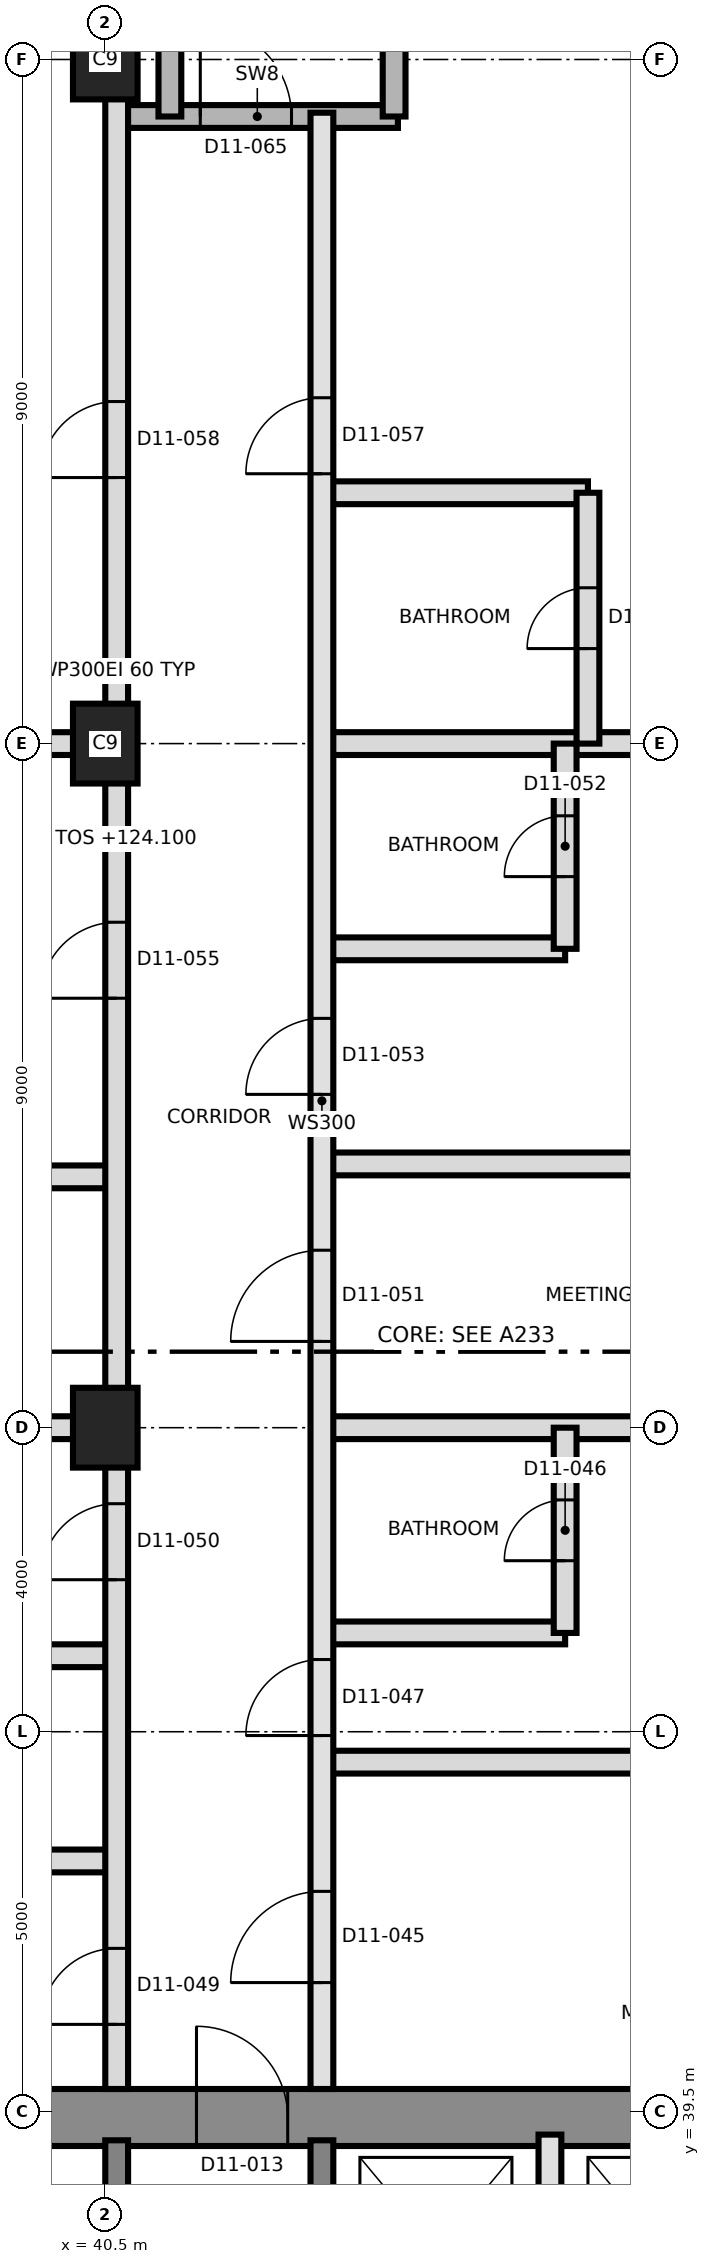
"""IFC4 building model, lengths in metres.
Left out: names, types, materials, properties, quantities, classifications, styles, units other than length and angle.
Written with IfcOpenShell. Run it as: python <this file> out.ifc"""

import sys

from ifc_helpers import new_model, si_unit, direction, frame, frame_2d, origin, origin_2d, place, context, subcontext, project, spatial, rectangle, extrude, element, fill, save


model = new_model("IFC4")
c1 = context("Model", 3, precision=1e-05, world=origin(), true_north=direction((0.0, 1.0)))
c2 = subcontext(c1, "Body", "Model", "MODEL_VIEW")
j1 = project(units=[si_unit("LENGTHUNIT", "METRE"), si_unit("PLANEANGLEUNIT", "RADIAN")], contexts=[c1])
p1 = place(None, origin())
s1 = spatial("IfcSite", under=j1, at=p1, CompositionType="ELEMENT")
p2 = place(p1, origin())
s2 = spatial("IfcBuilding", under=s1, at=p2, CompositionType="ELEMENT")
p3 = place(p2, frame((0.0, 0.0, 124.1)))
s3 = spatial("IfcBuildingStorey", under=s2, at=p3, CompositionType="ELEMENT", Elevation=124.1)
p4 = place(p3, frame((31.125, 39.425, 0.0), z_axis=(0.0, 0.0, 1.0), x_axis=(1.0, 0.0, 0.0)))
e1 = element("IfcWall", 1, at=p4, inside=s3, PredefinedType="SHEAR", context=c2, shape_type="SweptSolid", body=[
    extrude(rectangle(XDim=27.0, YDim=0.75, at=frame_2d((13.5, 0.0))), origin(), (0.0, 0.0, 1.0), 3.7),
])
p5 = place(p4, frame((10.575, 0.0, 0.0)))
e2 = element("IfcOpeningElement", 2, at=p5, cuts=e1, PredefinedType="OPENING", context=c2, shape_type="SweptSolid", body=[
    extrude(rectangle(XDim=1.2, YDim=2.1, at=frame_2d((0.6, 1.05))), frame((0.0, 0.385, 0.0), z_axis=(0.0, -1.0, 0.0), x_axis=(1.0, 0.0, 0.0)), (0.0, 0.0, 1.0), 0.77),
])
for number, where, z_axis, x_axis in (
    (3, (40.65, 33.5, 0.0), (0.0, 0.0, 1.0), (0.0, 1.0, 0.0)),
    (4, (43.35, 33.5, 0.0), (0.0, 0.0, 1.0), (0.0, 1.0, 0.0)),
):
    element("IfcWall", number, at=place(p3, frame(where, z_axis=z_axis, x_axis=x_axis)), inside=s3, PredefinedType="SHEAR", context=c2, shape_type="SweptSolid", body=[
        extrude(rectangle(XDim=5.625, YDim=0.3, at=frame_2d((2.812, 0.0))), origin(), (0.0, 0.0, 1.0), 3.7),
    ])
for number, where, z_axis, x_axis in (
    (5, (40.5, 48.5, 0.0), (0.0, 0.0, 1.0), (0.0, 1.0, 0.0)),
    (6, (40.5, 57.5, 0.0), (0.0, 0.0, 1.0), (0.0, 1.0, 0.0)),
    (7, (40.5, 66.5, 0.0), (0.0, 0.0, 1.0), (0.0, 1.0, 0.0)),
):
    element("IfcColumn", number, at=place(p3, frame(where, z_axis=z_axis, x_axis=x_axis)), inside=s3, PredefinedType="COLUMN", context=c2, shape_type="SweptSolid", body=[
        extrude(rectangle(XDim=1.05, YDim=0.85, at=origin_2d()), origin(), (0.0, 0.0, 1.0), 3.7),
    ])
p6 = place(p3, frame((46.35, 36.2, 0.0), z_axis=(0.0, 0.0, 1.0), x_axis=(0.0, 1.0, 0.0)))
e8 = element("IfcWall", 8, at=p6, inside=s3, PredefinedType="SOLIDWALL", context=c2, shape_type="SweptSolid", body=[
    extrude(rectangle(XDim=3.0, YDim=0.3, at=frame_2d((1.5, 0.0))), origin(), (0.0, 0.0, 1.0), 3.4),
])
p7 = place(p3, frame((37.45, 42.8, 0.0), z_axis=(0.0, 0.0, 1.0), x_axis=(1.0, 0.0, 0.0)))
e9 = element("IfcWall", 9, at=p7, inside=s3, PredefinedType="PARTITIONING", context=c2, shape_type="SweptSolid", body=[
    extrude(rectangle(XDim=3.2, YDim=0.3, at=frame_2d((1.6, 0.0))), origin(), (0.0, 0.0, 1.0), 3.4),
])
p8 = place(p3, frame((43.35, 44.1, 0.0), z_axis=(0.0, 0.0, 1.0), x_axis=(1.0, 0.0, 0.0)))
e10 = element("IfcWall", 10, at=p8, inside=s3, PredefinedType="PARTITIONING", context=c2, shape_type="SweptSolid", body=[
    extrude(rectangle(XDim=8.032, YDim=0.3, at=frame_2d((4.016, 0.0))), origin(), (0.0, 0.0, 1.0), 3.4),
])
p9 = place(p3, frame((30.135, 45.5, 0.0), z_axis=(0.0, 0.0, 1.0), x_axis=(1.0, 0.0, 0.0)))
e11 = element("IfcWall", 11, at=p9, inside=s3, PredefinedType="PARTITIONING", context=c2, shape_type="SweptSolid", body=[
    extrude(rectangle(XDim=10.515, YDim=0.3, at=frame_2d((5.257, 0.0))), origin(), (0.0, 0.0, 1.0), 3.4),
])
p10 = place(p3, frame((43.35, 45.8, 0.0), z_axis=(0.0, 0.0, 1.0), x_axis=(1.0, 0.0, 0.0)))
e12 = element("IfcWall", 12, at=p10, inside=s3, PredefinedType="PARTITIONING", context=c2, shape_type="SweptSolid", body=[
    extrude(rectangle(XDim=3.2, YDim=0.3, at=frame_2d((1.6, 0.0))), origin(), (0.0, 0.0, 1.0), 3.4),
])
p11 = place(p3, frame((30.135, 48.5, 0.0), z_axis=(0.0, 0.0, 1.0), x_axis=(1.0, 0.0, 0.0)))
e13 = element("IfcWall", 13, at=p11, inside=s3, PredefinedType="PARTITIONING", context=c2, shape_type="SweptSolid", body=[
    extrude(rectangle(XDim=10.515, YDim=0.3, at=frame_2d((5.257, 0.0))), origin(), (0.0, 0.0, 1.0), 3.4),
])
p12 = place(p3, frame((43.35, 48.5, 0.0), z_axis=(0.0, 0.0, 1.0), x_axis=(1.0, 0.0, 0.0)))
e14 = element("IfcWall", 14, at=p12, inside=s3, PredefinedType="PARTITIONING", context=c2, shape_type="SweptSolid", body=[
    extrude(rectangle(XDim=7.695, YDim=0.3, at=frame_2d((3.847, 0.0))), origin(), (0.0, 0.0, 1.0), 3.4),
])
p13 = place(p3, frame((37.15, 51.8, 0.0), z_axis=(0.0, 0.0, 1.0), x_axis=(1.0, 0.0, 0.0)))
e15 = element("IfcWall", 15, at=p13, inside=s3, PredefinedType="PARTITIONING", context=c2, shape_type="SweptSolid", body=[
    extrude(rectangle(XDim=3.5, YDim=0.3, at=frame_2d((1.75, 0.0))), origin(), (0.0, 0.0, 1.0), 3.4),
])
p14 = place(p3, frame((43.35, 51.97, 0.0), z_axis=(0.0, 0.0, 1.0), x_axis=(1.0, 0.0, 0.0)))
e16 = element("IfcWall", 16, at=p14, inside=s3, PredefinedType="PARTITIONING", context=c2, shape_type="SweptSolid", body=[
    extrude(rectangle(XDim=7.695, YDim=0.3, at=frame_2d((3.847, 0.0))), origin(), (0.0, 0.0, 1.0), 3.4),
])
p15 = place(p3, frame((43.35, 54.8, 0.0), z_axis=(0.0, 0.0, 1.0), x_axis=(1.0, 0.0, 0.0)))
e17 = element("IfcWall", 17, at=p15, inside=s3, PredefinedType="PARTITIONING", context=c2, shape_type="SweptSolid", body=[
    extrude(rectangle(XDim=3.2, YDim=0.3, at=frame_2d((1.6, 0.0))), origin(), (0.0, 0.0, 1.0), 3.4),
])
p16 = place(p3, frame((30.135, 57.5, 0.0), z_axis=(0.0, 0.0, 1.0), x_axis=(1.0, 0.0, 0.0)))
e18 = element("IfcWall", 18, at=p16, inside=s3, PredefinedType="PARTITIONING", context=c2, shape_type="SweptSolid", body=[
    extrude(rectangle(XDim=10.515, YDim=0.3, at=frame_2d((5.257, 0.0))), origin(), (0.0, 0.0, 1.0), 3.4),
])
p17 = place(p3, frame((43.35, 57.5, 0.0), z_axis=(0.0, 0.0, 1.0), x_axis=(1.0, 0.0, 0.0)))
e19 = element("IfcWall", 19, at=p17, inside=s3, PredefinedType="PARTITIONING", context=c2, shape_type="SweptSolid", body=[
    extrude(rectangle(XDim=7.695, YDim=0.3, at=frame_2d((3.847, 0.0))), origin(), (0.0, 0.0, 1.0), 3.4),
])
p18 = place(p3, frame((43.35, 60.8, 0.0), z_axis=(0.0, 0.0, 1.0), x_axis=(1.0, 0.0, 0.0)))
e20 = element("IfcWall", 20, at=p18, inside=s3, PredefinedType="PARTITIONING", context=c2, shape_type="SweptSolid", body=[
    extrude(rectangle(XDim=3.5, YDim=0.3, at=frame_2d((1.75, 0.0))), origin(), (0.0, 0.0, 1.0), 3.4),
])
p19 = place(p3, frame((40.65, 65.75, 0.0), z_axis=(0.0, 0.0, 1.0), x_axis=(1.0, 0.0, 0.0)))
e21 = element("IfcWall", 21, at=p19, inside=s3, PredefinedType="SHEAR", context=c2, shape_type="SweptSolid", body=[
    extrude(rectangle(XDim=3.7, YDim=0.3, at=frame_2d((1.85, 0.0))), origin(), (0.0, 0.0, 1.0), 3.4),
])
p20 = place(p19, frame((1.1, 0.0, 0.0)))
e22 = element("IfcOpeningElement", 22, at=p20, cuts=e21, PredefinedType="OPENING", context=c2, shape_type="SweptSolid", body=[
    extrude(rectangle(XDim=1.2, YDim=2.1, at=frame_2d((0.6, 1.05))), frame((0.0, 0.16, 0.0), z_axis=(0.0, -1.0, 0.0), x_axis=(1.0, 0.0, 0.0)), (0.0, 0.0, 1.0), 0.32),
])
p21 = place(p3, frame((40.65, 39.8, 0.0), z_axis=(0.0, 0.0, 1.0), x_axis=(0.0, 1.0, 0.0)))
e23 = element("IfcWall", 23, at=p21, inside=s3, PredefinedType="PARTITIONING", context=c2, shape_type="SweptSolid", body=[
    extrude(rectangle(XDim=37.305, YDim=0.3, at=frame_2d((18.652, 0.0))), origin(), (0.0, 0.0, 1.0), 3.4),
])
p22 = place(p21, frame((0.85, 0.0, 0.0)))
e24 = element("IfcOpeningElement", 24, at=p22, cuts=e23, PredefinedType="OPENING", context=c2, shape_type="SweptSolid", body=[
    extrude(rectangle(XDim=1.0, YDim=2.1, at=frame_2d((0.5, 1.05))), frame((0.0, 0.16, 0.0), z_axis=(0.0, -1.0, 0.0), x_axis=(1.0, 0.0, 0.0)), (0.0, 0.0, 1.0), 0.32),
])
p23 = place(p21, frame((6.7, 0.0, 0.0)))
e25 = element("IfcOpeningElement", 25, at=p23, cuts=e23, PredefinedType="OPENING", context=c2, shape_type="SweptSolid", body=[
    extrude(rectangle(XDim=1.0, YDim=2.1, at=frame_2d((0.5, 1.05))), frame((0.0, 0.16, 0.0), z_axis=(0.0, -1.0, 0.0), x_axis=(1.0, 0.0, 0.0)), (0.0, 0.0, 1.0), 0.32),
])
p24 = place(p21, frame((14.35, 0.0, 0.0)))
e26 = element("IfcOpeningElement", 26, at=p24, cuts=e23, PredefinedType="OPENING", context=c2, shape_type="SweptSolid", body=[
    extrude(rectangle(XDim=1.0, YDim=2.4, at=frame_2d((0.5, 1.2))), frame((0.0, 0.16, 0.0), z_axis=(0.0, -1.0, 0.0), x_axis=(1.0, 0.0, 0.0)), (0.0, 0.0, 1.0), 0.32),
])
p25 = place(p21, frame((21.2, 0.0, 0.0)))
e27 = element("IfcOpeningElement", 27, at=p25, cuts=e23, PredefinedType="OPENING", context=c2, shape_type="SweptSolid", body=[
    extrude(rectangle(XDim=1.0, YDim=2.4, at=frame_2d((0.5, 1.2))), frame((0.0, 0.16, 0.0), z_axis=(0.0, -1.0, 0.0), x_axis=(1.0, 0.0, 0.0)), (0.0, 0.0, 1.0), 0.32),
])
p26 = place(p3, frame((41.35, 65.75, 0.0), z_axis=(0.0, 0.0, 1.0), x_axis=(0.0, 1.0, 0.0)))
e28 = element("IfcWall", 28, at=p26, inside=s3, PredefinedType="SHEAR", context=c2, shape_type="SweptSolid", body=[
    extrude(rectangle(XDim=8.85, YDim=0.3, at=frame_2d((4.425, 0.0))), origin(), (0.0, 0.0, 1.0), 3.4),
])
p27 = place(p3, frame((43.35, 39.8, 0.0), z_axis=(0.0, 0.0, 1.0), x_axis=(0.0, 1.0, 0.0)))
e29 = element("IfcWall", 29, at=p27, inside=s3, PredefinedType="SOLIDWALL", context=c2, shape_type="SweptSolid", body=[
    extrude(rectangle(XDim=26.0, YDim=0.3, at=frame_2d((13.0, 0.0))), origin(), (0.0, 0.0, 1.0), 3.4),
])
p28 = place(p27, frame((1.4, 0.0, 0.0)))
e30 = element("IfcOpeningElement", 30, at=p28, cuts=e29, PredefinedType="OPENING", context=c2, shape_type="SweptSolid", body=[
    extrude(rectangle(XDim=1.2, YDim=2.1, at=frame_2d((0.6, 1.05))), frame((0.0, 0.16, 0.0), z_axis=(0.0, -1.0, 0.0), x_axis=(1.0, 0.0, 0.0)), (0.0, 0.0, 1.0), 0.32),
])
p29 = place(p27, frame((4.65, 0.0, 0.0)))
e31 = element("IfcOpeningElement", 31, at=p29, cuts=e29, PredefinedType="OPENING", context=c2, shape_type="SweptSolid", body=[
    extrude(rectangle(XDim=1.0, YDim=2.1, at=frame_2d((0.5, 1.05))), frame((0.0, 0.16, 0.0), z_axis=(0.0, -1.0, 0.0), x_axis=(1.0, 0.0, 0.0)), (0.0, 0.0, 1.0), 0.32),
])
p30 = place(p27, frame((9.835, 0.0, 0.0)))
e32 = element("IfcOpeningElement", 32, at=p30, cuts=e29, PredefinedType="OPENING", context=c2, shape_type="SweptSolid", body=[
    extrude(rectangle(XDim=1.2, YDim=2.1, at=frame_2d((0.6, 1.05))), frame((0.0, 0.16, 0.0), z_axis=(0.0, -1.0, 0.0), x_axis=(1.0, 0.0, 0.0)), (0.0, 0.0, 1.0), 0.32),
])
p31 = place(p27, frame((13.085, 0.0, 0.0)))
e33 = element("IfcOpeningElement", 33, at=p31, cuts=e29, PredefinedType="OPENING", context=c2, shape_type="SweptSolid", body=[
    extrude(rectangle(XDim=1.0, YDim=2.1, at=frame_2d((0.5, 1.05))), frame((0.0, 0.16, 0.0), z_axis=(0.0, -1.0, 0.0), x_axis=(1.0, 0.0, 0.0)), (0.0, 0.0, 1.0), 0.32),
])
p32 = place(p27, frame((21.25, 0.0, 0.0)))
e34 = element("IfcOpeningElement", 34, at=p32, cuts=e29, PredefinedType="OPENING", context=c2, shape_type="SweptSolid", body=[
    extrude(rectangle(XDim=1.0, YDim=2.4, at=frame_2d((0.5, 1.2))), frame((0.0, 0.16, 0.0), z_axis=(0.0, -1.0, 0.0), x_axis=(1.0, 0.0, 0.0)), (0.0, 0.0, 1.0), 0.32),
])
p33 = place(p3, frame((44.3, 65.75, 0.0), z_axis=(0.0, 0.0, 1.0), x_axis=(0.0, 1.0, 0.0)))
e35 = element("IfcWall", 35, at=p33, inside=s3, PredefinedType="SHEAR", context=c2, shape_type="SweptSolid", body=[
    extrude(rectangle(XDim=8.85, YDim=0.3, at=frame_2d((4.425, 0.0))), origin(), (0.0, 0.0, 1.0), 3.4),
])
p34 = place(p3, frame((46.55, 45.8, 0.0), z_axis=(0.0, 0.0, 1.0), x_axis=(0.0, 1.0, 0.0)))
e36 = element("IfcWall", 36, at=p34, inside=s3, PredefinedType="PARTITIONING", context=c2, shape_type="SweptSolid", body=[
    extrude(rectangle(XDim=2.7, YDim=0.3, at=frame_2d((1.35, 0.0))), origin(), (0.0, 0.0, 1.0), 3.4),
])
p35 = place(p34, frame((0.95, 0.0, 0.0)))
e37 = element("IfcOpeningElement", 37, at=p35, cuts=e36, PredefinedType="OPENING", context=c2, shape_type="SweptSolid", body=[
    extrude(rectangle(XDim=0.8, YDim=2.1, at=frame_2d((0.4, 1.05))), frame((0.0, 0.16, 0.0), z_axis=(0.0, -1.0, 0.0), x_axis=(1.0, 0.0, 0.0)), (0.0, 0.0, 1.0), 0.32),
])
p36 = place(p3, frame((46.55, 54.8, 0.0), z_axis=(0.0, 0.0, 1.0), x_axis=(0.0, 1.0, 0.0)))
e38 = element("IfcWall", 38, at=p36, inside=s3, PredefinedType="PARTITIONING", context=c2, shape_type="SweptSolid", body=[
    extrude(rectangle(XDim=2.7, YDim=0.3, at=frame_2d((1.35, 0.0))), origin(), (0.0, 0.0, 1.0), 3.4),
])
p37 = place(p36, frame((0.95, 0.0, 0.0)))
e39 = element("IfcOpeningElement", 39, at=p37, cuts=e38, PredefinedType="OPENING", context=c2, shape_type="SweptSolid", body=[
    extrude(rectangle(XDim=0.8, YDim=2.1, at=frame_2d((0.4, 1.05))), frame((0.0, 0.16, 0.0), z_axis=(0.0, -1.0, 0.0), x_axis=(1.0, 0.0, 0.0)), (0.0, 0.0, 1.0), 0.32),
])
p38 = place(p3, frame((46.85, 57.5, 0.0), z_axis=(0.0, 0.0, 1.0), x_axis=(0.0, 1.0, 0.0)))
e40 = element("IfcWall", 40, at=p38, inside=s3, PredefinedType="PARTITIONING", context=c2, shape_type="SweptSolid", body=[
    extrude(rectangle(XDim=3.3, YDim=0.3, at=frame_2d((1.65, 0.0))), origin(), (0.0, 0.0, 1.0), 3.4),
])
p39 = place(p38, frame((1.25, 0.0, 0.0)))
e41 = element("IfcOpeningElement", 41, at=p39, cuts=e40, PredefinedType="OPENING", context=c2, shape_type="SweptSolid", body=[
    extrude(rectangle(XDim=0.8, YDim=2.1, at=frame_2d((0.4, 1.05))), frame((0.0, 0.16, 0.0), z_axis=(0.0, -1.0, 0.0), x_axis=(1.0, 0.0, 0.0)), (0.0, 0.0, 1.0), 0.32),
])
p40 = place(p5, origin())
e42 = element("IfcDoor", 42, at=p40, inside=s3, OperationType="SINGLE_SWING_RIGHT", PredefinedType="DOOR", context=c2, shape_type="SweptSolid", body=[
    extrude(rectangle(XDim=1.2, YDim=2.1, at=frame_2d((0.6, 1.05))), frame((0.0, 0.025, 0.0), z_axis=(0.0, -1.0, 0.0), x_axis=(1.0, 0.0, 0.0)), (0.0, 0.0, 1.0), 0.05),
])
fill(e2, e42)
p41 = place(p28, origin())
e43 = element("IfcDoor", 43, at=p41, inside=s3, OperationType="SINGLE_SWING_LEFT", PredefinedType="DOOR", context=c2, shape_type="SweptSolid", body=[
    extrude(rectangle(XDim=1.2, YDim=2.1, at=frame_2d((0.6, 1.05))), frame((0.0, 0.025, 0.0), z_axis=(0.0, -1.0, 0.0), x_axis=(1.0, 0.0, 0.0)), (0.0, 0.0, 1.0), 0.05),
])
fill(e30, e43)
p42 = place(p35, origin())
e44 = element("IfcDoor", 44, at=p42, inside=s3, OperationType="SINGLE_SWING_RIGHT", PredefinedType="DOOR", context=c2, shape_type="SweptSolid", body=[
    extrude(rectangle(XDim=0.8, YDim=2.1, at=frame_2d((0.4, 1.05))), frame((0.0, 0.025, 0.0), z_axis=(0.0, -1.0, 0.0), x_axis=(1.0, 0.0, 0.0)), (0.0, 0.0, 1.0), 0.05),
])
fill(e37, e44)
p43 = place(p29, origin())
e45 = element("IfcDoor", 45, at=p43, inside=s3, OperationType="SINGLE_SWING_LEFT", PredefinedType="DOOR", context=c2, shape_type="SweptSolid", body=[
    extrude(rectangle(XDim=1.0, YDim=2.1, at=frame_2d((0.5, 1.05))), frame((0.0, 0.025, 0.0), z_axis=(0.0, -1.0, 0.0), x_axis=(1.0, 0.0, 0.0)), (0.0, 0.0, 1.0), 0.05),
])
fill(e31, e45)
p44 = place(p22, origin())
e46 = element("IfcDoor", 46, at=p44, inside=s3, OperationType="SINGLE_SWING_LEFT", PredefinedType="DOOR", context=c2, shape_type="SweptSolid", body=[
    extrude(rectangle(XDim=1.0, YDim=2.1, at=frame_2d((0.5, 1.05))), frame((0.0, 0.025, 0.0), z_axis=(0.0, -1.0, 0.0), x_axis=(1.0, 0.0, 0.0)), (0.0, 0.0, 1.0), 0.05),
])
fill(e24, e46)
p45 = place(p23, origin())
e47 = element("IfcDoor", 47, at=p45, inside=s3, OperationType="SINGLE_SWING_RIGHT", PredefinedType="DOOR", context=c2, shape_type="SweptSolid", body=[
    extrude(rectangle(XDim=1.0, YDim=2.1, at=frame_2d((0.5, 1.05))), frame((0.0, 0.025, 0.0), z_axis=(0.0, -1.0, 0.0), x_axis=(1.0, 0.0, 0.0)), (0.0, 0.0, 1.0), 0.05),
])
fill(e25, e47)
p46 = place(p30, origin())
e48 = element("IfcDoor", 48, at=p46, inside=s3, OperationType="SINGLE_SWING_LEFT", PredefinedType="DOOR", context=c2, shape_type="SweptSolid", body=[
    extrude(rectangle(XDim=1.2, YDim=2.1, at=frame_2d((0.6, 1.05))), frame((0.0, 0.025, 0.0), z_axis=(0.0, -1.0, 0.0), x_axis=(1.0, 0.0, 0.0)), (0.0, 0.0, 1.0), 0.05),
])
fill(e32, e48)
p47 = place(p37, origin())
e49 = element("IfcDoor", 49, at=p47, inside=s3, OperationType="SINGLE_SWING_RIGHT", PredefinedType="DOOR", context=c2, shape_type="SweptSolid", body=[
    extrude(rectangle(XDim=0.8, YDim=2.1, at=frame_2d((0.4, 1.05))), frame((0.0, 0.025, 0.0), z_axis=(0.0, -1.0, 0.0), x_axis=(1.0, 0.0, 0.0)), (0.0, 0.0, 1.0), 0.05),
])
fill(e39, e49)
p48 = place(p31, origin())
e50 = element("IfcDoor", 50, at=p48, inside=s3, OperationType="SINGLE_SWING_LEFT", PredefinedType="DOOR", context=c2, shape_type="SweptSolid", body=[
    extrude(rectangle(XDim=1.0, YDim=2.1, at=frame_2d((0.5, 1.05))), frame((0.0, 0.025, 0.0), z_axis=(0.0, -1.0, 0.0), x_axis=(1.0, 0.0, 0.0)), (0.0, 0.0, 1.0), 0.05),
])
fill(e33, e50)
p49 = place(p24, origin())
e51 = element("IfcDoor", 51, at=p49, inside=s3, OperationType="SINGLE_SWING_LEFT", PredefinedType="DOOR", context=c2, shape_type="SweptSolid", body=[
    extrude(rectangle(XDim=1.0, YDim=2.4, at=frame_2d((0.5, 1.2))), frame((0.0, 0.025, 0.0), z_axis=(0.0, -1.0, 0.0), x_axis=(1.0, 0.0, 0.0)), (0.0, 0.0, 1.0), 0.05),
])
fill(e26, e51)
p50 = place(p39, origin())
e52 = element("IfcDoor", 52, at=p50, inside=s3, OperationType="SINGLE_SWING_LEFT", PredefinedType="DOOR", context=c2, shape_type="SweptSolid", body=[
    extrude(rectangle(XDim=0.8, YDim=2.1, at=frame_2d((0.4, 1.05))), frame((0.0, 0.025, 0.0), z_axis=(0.0, -1.0, 0.0), x_axis=(1.0, 0.0, 0.0)), (0.0, 0.0, 1.0), 0.05),
])
fill(e41, e52)
p51 = place(p32, origin())
e53 = element("IfcDoor", 53, at=p51, inside=s3, OperationType="SINGLE_SWING_RIGHT", PredefinedType="DOOR", context=c2, shape_type="SweptSolid", body=[
    extrude(rectangle(XDim=1.0, YDim=2.4, at=frame_2d((0.5, 1.2))), frame((0.0, 0.025, 0.0), z_axis=(0.0, -1.0, 0.0), x_axis=(1.0, 0.0, 0.0)), (0.0, 0.0, 1.0), 0.05),
])
fill(e34, e53)
p52 = place(p25, origin())
e54 = element("IfcDoor", 54, at=p52, inside=s3, OperationType="SINGLE_SWING_LEFT", PredefinedType="DOOR", context=c2, shape_type="SweptSolid", body=[
    extrude(rectangle(XDim=1.0, YDim=2.4, at=frame_2d((0.5, 1.2))), frame((0.0, 0.025, 0.0), z_axis=(0.0, -1.0, 0.0), x_axis=(1.0, 0.0, 0.0)), (0.0, 0.0, 1.0), 0.05),
])
fill(e27, e54)
p53 = place(p20, origin())
e55 = element("IfcDoor", 55, at=p53, inside=s3, OperationType="SINGLE_SWING_RIGHT", PredefinedType="DOOR", context=c2, shape_type="SweptSolid", body=[
    extrude(rectangle(XDim=1.2, YDim=2.1, at=frame_2d((0.6, 1.05))), frame((0.0, 0.025, 0.0), z_axis=(0.0, -1.0, 0.0), x_axis=(1.0, 0.0, 0.0)), (0.0, 0.0, 1.0), 0.05),
])
fill(e22, e55)
save(model, sys.argv[1])
